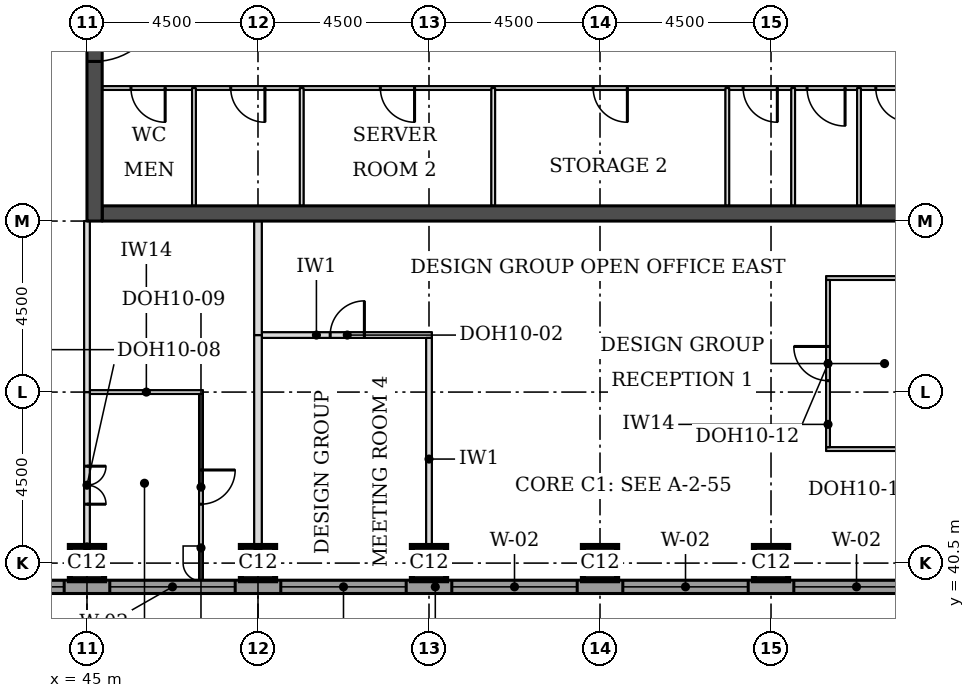
"""IFC4 building model, lengths in metres.
Left out: names, types, materials, properties, quantities, classifications, styles, units other than length and angle.
Written with IfcOpenShell. Run it as: python <this file> out.ifc"""

import sys

from ifc_helpers import new_model, si_unit, direction, frame, frame_2d, origin, origin_2d, place, context, subcontext, project, spatial, rectangle, extrude, element, fill, save


model = new_model("IFC4")
c1 = context("Model", 3, precision=1e-05, world=origin(), true_north=direction((0.0, 1.0)))
c2 = subcontext(c1, "Body", "Model", "MODEL_VIEW")
j1 = project(units=[si_unit("LENGTHUNIT", "METRE"), si_unit("PLANEANGLEUNIT", "RADIAN")], contexts=[c1])
p1 = place(None, origin())
s1 = spatial("IfcSite", under=j1, at=p1, CompositionType="ELEMENT")
p2 = place(p1, origin())
s2 = spatial("IfcBuilding", under=s1, at=p2, CompositionType="ELEMENT")
p3 = place(p2, frame((0.0, 0.0, 223.0)))
s3 = spatial("IfcBuildingStorey", under=s2, at=p3, CompositionType="ELEMENT", Elevation=223.0)
for number, where, z_axis, x_axis in (
    (1, (45.0, 40.5, 0.0), (0.0, 0.0, 1.0), (1.0, 0.0, 0.0)),
    (2, (49.5, 40.5, 0.0), (0.0, 0.0, 1.0), (1.0, 0.0, 0.0)),
    (3, (54.0, 40.5, 0.0), (0.0, 0.0, 1.0), (1.0, 0.0, 0.0)),
    (4, (58.5, 40.5, 0.0), (0.0, 0.0, 1.0), (1.0, 0.0, 0.0)),
    (5, (63.0, 40.5, 0.0), (0.0, 0.0, 1.0), (1.0, 0.0, 0.0)),
):
    element("IfcColumn", number, at=place(p3, frame(where, z_axis=z_axis, x_axis=x_axis)), inside=s3, PredefinedType="COLUMN", context=c2, shape_type="SweptSolid", body=[
        extrude(rectangle(XDim=0.9, YDim=0.9, at=origin_2d()), origin(), (0.0, 0.0, 1.0), 3.7),
    ])
p4 = place(p3, frame((45.4, 49.7, 0.0), z_axis=(0.0, 0.0, 1.0), x_axis=(1.0, 0.0, 0.0)))
e6 = element("IfcWall", 6, at=p4, inside=s3, PredefinedType="SHEAR", context=c2, shape_type="SweptSolid", body=[
    extrude(rectangle(XDim=21.7, YDim=0.4, at=frame_2d((10.85, 0.0))), origin(), (0.0, 0.0, 1.0), 3.7),
])
p5 = place(p3, frame((45.2, 49.5, 0.0), z_axis=(0.0, 0.0, 1.0), x_axis=(0.0, 1.0, 0.0)))
e7 = element("IfcWall", 7, at=p5, inside=s3, PredefinedType="SHEAR", context=c2, shape_type="SweptSolid", body=[
    extrude(rectangle(XDim=22.5, YDim=0.4, at=frame_2d((11.25, 0.0))), origin(), (0.0, 0.0, 1.0), 3.7),
])
p6 = place(p5, frame((4.2, 0.0, 0.0)))
e8 = element("IfcOpeningElement", 8, at=p6, cuts=e7, PredefinedType="OPENING", context=c2, shape_type="SweptSolid", body=[
    extrude(rectangle(XDim=1.8, YDim=2.1, at=frame_2d((0.9, 1.05))), frame((0.0, 0.21, 0.0), z_axis=(0.0, -1.0, 0.0), x_axis=(1.0, 0.0, 0.0)), (0.0, 0.0, 1.0), 0.42),
])
p7 = place(p5, frame((6.9, 0.0, 0.0)))
e9 = element("IfcOpeningElement", 9, at=p7, cuts=e7, PredefinedType="OPENING", context=c2, shape_type="SweptSolid", body=[
    extrude(rectangle(XDim=1.1, YDim=2.1, at=frame_2d((0.55, 1.05))), frame((0.0, 0.21, 0.0), z_axis=(0.0, -1.0, 0.0), x_axis=(1.0, 0.0, 0.0)), (0.0, 0.0, 1.0), 0.42),
])
p8 = place(p5, frame((13.6, 0.0, 0.0)))
e10 = element("IfcOpeningElement", 10, at=p8, cuts=e7, PredefinedType="OPENING", context=c2, shape_type="SweptSolid", body=[
    extrude(rectangle(XDim=1.1, YDim=2.1, at=frame_2d((0.55, 1.05))), frame((0.0, 0.21, 0.0), z_axis=(0.0, -1.0, 0.0), x_axis=(1.0, 0.0, 0.0)), (0.0, 0.0, 1.0), 0.42),
])
p9 = place(p5, frame((16.5, 0.0, 0.0)))
e11 = element("IfcOpeningElement", 11, at=p9, cuts=e7, PredefinedType="OPENING", context=c2, shape_type="SweptSolid", body=[
    extrude(rectangle(XDim=1.8, YDim=2.1, at=frame_2d((0.9, 1.05))), frame((0.0, 0.21, 0.0), z_axis=(0.0, -1.0, 0.0), x_axis=(1.0, 0.0, 0.0)), (0.0, 0.0, 1.0), 0.42),
])
p10 = place(p3, frame((36.0, 39.875, 0.0), z_axis=(0.0, 0.0, 1.0), x_axis=(1.0, 0.0, 0.0)))
e12 = element("IfcWall", 12, at=p10, inside=s3, PredefinedType="STANDARD", context=c2, shape_type="SweptSolid", body=[
    extrude(rectangle(XDim=36.331, YDim=0.35, at=frame_2d((18.166, 0.0))), origin(), (0.0, 0.0, 1.0), 3.525),
])
p11 = place(p10, frame((5.1, 0.0, 0.9)))
e13 = element("IfcOpeningElement", 13, at=p11, cuts=e12, PredefinedType="OPENING", context=c2, shape_type="SweptSolid", body=[
    extrude(rectangle(XDim=3.3, YDim=1.9, at=frame_2d((1.65, 0.95))), frame((0.0, 0.185, 0.0), z_axis=(0.0, -1.0, 0.0), x_axis=(1.0, 0.0, 0.0)), (0.0, 0.0, 1.0), 0.37),
])
p12 = place(p10, frame((9.6, 0.0, 0.9)))
e14 = element("IfcOpeningElement", 14, at=p12, cuts=e12, PredefinedType="OPENING", context=c2, shape_type="SweptSolid", body=[
    extrude(rectangle(XDim=3.3, YDim=1.9, at=frame_2d((1.65, 0.95))), frame((0.0, 0.185, 0.0), z_axis=(0.0, -1.0, 0.0), x_axis=(1.0, 0.0, 0.0)), (0.0, 0.0, 1.0), 0.37),
])
p13 = place(p10, frame((14.1, 0.0, 0.9)))
e15 = element("IfcOpeningElement", 15, at=p13, cuts=e12, PredefinedType="OPENING", context=c2, shape_type="SweptSolid", body=[
    extrude(rectangle(XDim=3.3, YDim=1.9, at=frame_2d((1.65, 0.95))), frame((0.0, 0.185, 0.0), z_axis=(0.0, -1.0, 0.0), x_axis=(1.0, 0.0, 0.0)), (0.0, 0.0, 1.0), 0.37),
])
p14 = place(p10, frame((18.6, 0.0, 0.9)))
e16 = element("IfcOpeningElement", 16, at=p14, cuts=e12, PredefinedType="OPENING", context=c2, shape_type="SweptSolid", body=[
    extrude(rectangle(XDim=3.3, YDim=1.9, at=frame_2d((1.65, 0.95))), frame((0.0, 0.185, 0.0), z_axis=(0.0, -1.0, 0.0), x_axis=(1.0, 0.0, 0.0)), (0.0, 0.0, 1.0), 0.37),
])
p15 = place(p10, frame((23.1, 0.0, 0.9)))
e17 = element("IfcOpeningElement", 17, at=p15, cuts=e12, PredefinedType="OPENING", context=c2, shape_type="SweptSolid", body=[
    extrude(rectangle(XDim=3.3, YDim=1.9, at=frame_2d((1.65, 0.95))), frame((0.0, 0.185, 0.0), z_axis=(0.0, -1.0, 0.0), x_axis=(1.0, 0.0, 0.0)), (0.0, 0.0, 1.0), 0.37),
])
p16 = place(p10, frame((27.6, 0.0, 0.9)))
e18 = element("IfcOpeningElement", 18, at=p16, cuts=e12, PredefinedType="OPENING", context=c2, shape_type="SweptSolid", body=[
    extrude(rectangle(XDim=3.3, YDim=1.9, at=frame_2d((1.65, 0.95))), frame((0.0, 0.185, 0.0), z_axis=(0.0, -1.0, 0.0), x_axis=(1.0, 0.0, 0.0)), (0.0, 0.0, 1.0), 0.37),
])
for number, where, z_axis, x_axis in (
    (19, (64.45, 43.5, 0.0), (0.0, 0.0, 1.0), (1.0, 0.0, 0.0)),
    (20, (45.075, 45.0, 0.0), (0.0, 0.0, 1.0), (1.0, 0.0, 0.0)),
):
    element("IfcWall", number, at=place(p3, frame(where, z_axis=z_axis, x_axis=x_axis)), inside=s3, PredefinedType="PARTITIONING", context=c2, shape_type="SweptSolid", body=[
        extrude(rectangle(XDim=2.975, YDim=0.1, at=frame_2d((1.488, 0.0))), origin(), (0.0, 0.0, 1.0), 3.55),
    ])
p17 = place(p3, frame((49.6, 46.5, 0.0), z_axis=(0.0, 0.0, 1.0), x_axis=(1.0, 0.0, 0.0)))
e21 = element("IfcWall", 21, at=p17, inside=s3, PredefinedType="PARTITIONING", context=c2, shape_type="SweptSolid", body=[
    extrude(rectangle(XDim=4.475, YDim=0.15, at=frame_2d((2.237, 0.0))), origin(), (0.0, 0.0, 1.0), 3.55),
])
p18 = place(p17, frame((1.8, 0.0, 0.0)))
e22 = element("IfcOpeningElement", 22, at=p18, cuts=e21, PredefinedType="OPENING", context=c2, shape_type="SweptSolid", body=[
    extrude(rectangle(XDim=0.9, YDim=2.1, at=frame_2d((0.45, 1.05))), frame((0.0, 0.085, 0.0), z_axis=(0.0, -1.0, 0.0), x_axis=(1.0, 0.0, 0.0)), (0.0, 0.0, 1.0), 0.17),
])
p19 = place(p3, frame((64.45, 48.0, 0.0), z_axis=(0.0, 0.0, 1.0), x_axis=(1.0, 0.0, 0.0)))
e23 = element("IfcWall", 23, at=p19, inside=s3, PredefinedType="PARTITIONING", context=c2, shape_type="SweptSolid", body=[
    extrude(rectangle(XDim=2.975, YDim=0.1, at=frame_2d((1.488, 0.0))), origin(), (0.0, 0.0, 1.0), 3.55),
])
p20 = place(p3, frame((45.0, 40.05, 0.0), z_axis=(0.0, 0.0, 1.0), x_axis=(0.0, 1.0, 0.0)))
e24 = element("IfcWall", 24, at=p20, inside=s3, PredefinedType="PARTITIONING", context=c2, shape_type="SweptSolid", body=[
    extrude(rectangle(XDim=4.95, YDim=0.15, at=frame_2d((2.475, 0.0))), origin(), (0.0, 0.0, 1.0), 3.022),
])
p21 = place(p20, frame((2.0, 0.0, 0.0)))
e25 = element("IfcOpeningElement", 25, at=p21, cuts=e24, PredefinedType="OPENING", context=c2, shape_type="SweptSolid", body=[
    extrude(rectangle(XDim=1.0, YDim=2.1, at=frame_2d((0.5, 1.05))), frame((0.0, 0.085, 0.0), z_axis=(0.0, -1.0, 0.0), x_axis=(1.0, 0.0, 0.0)), (0.0, 0.0, 1.0), 0.17),
])
p22 = place(p3, frame((48.0, 40.05, 0.0), z_axis=(0.0, 0.0, 1.0), x_axis=(0.0, 1.0, 0.0)))
e26 = element("IfcWall", 26, at=p22, inside=s3, PredefinedType="PARTITIONING", context=c2, shape_type="SweptSolid", body=[
    extrude(rectangle(XDim=4.9, YDim=0.1, at=frame_2d((2.45, 0.0))), origin(), (0.0, 0.0, 1.0), 3.55),
])
p23 = place(p22, frame((2.0, 0.0, 0.0)))
e27 = element("IfcOpeningElement", 27, at=p23, cuts=e26, PredefinedType="OPENING", context=c2, shape_type="SweptSolid", body=[
    extrude(rectangle(XDim=0.9, YDim=2.1, at=frame_2d((0.45, 1.05))), frame((0.0, 0.06, 0.0), z_axis=(0.0, -1.0, 0.0), x_axis=(1.0, 0.0, 0.0)), (0.0, 0.0, 1.0), 0.12),
])
p24 = place(p3, frame((49.5, 40.05, 0.0), z_axis=(0.0, 0.0, 1.0), x_axis=(0.0, 1.0, 0.0)))
e28 = element("IfcWall", 28, at=p24, inside=s3, PredefinedType="PARTITIONING", context=c2, shape_type="SweptSolid", body=[
    extrude(rectangle(XDim=6.45, YDim=0.2, at=frame_2d((3.225, 0.0))), origin(), (0.0, 0.0, 1.0), 3.55),
])
p25 = place(p3, frame((54.0, 40.05, 0.0), z_axis=(0.0, 0.0, 1.0), x_axis=(0.0, 1.0, 0.0)))
e29 = element("IfcWall", 29, at=p25, inside=s3, PredefinedType="PARTITIONING", context=c2, shape_type="SweptSolid", body=[
    extrude(rectangle(XDim=6.375, YDim=0.15, at=frame_2d((3.188, 0.0))), origin(), (0.0, 0.0, 1.0), 3.55),
])
p26 = place(p3, frame((64.5, 43.55, 0.0), z_axis=(0.0, 0.0, 1.0), x_axis=(0.0, 1.0, 0.0)))
e30 = element("IfcWall", 30, at=p26, inside=s3, PredefinedType="PARTITIONING", context=c2, shape_type="SweptSolid", body=[
    extrude(rectangle(XDim=4.4, YDim=0.1, at=frame_2d((2.2, 0.0))), origin(), (0.0, 0.0, 1.0), 3.55),
])
p27 = place(p26, frame((1.75, 0.0, 0.0)))
e31 = element("IfcOpeningElement", 31, at=p27, cuts=e30, PredefinedType="OPENING", context=c2, shape_type="SweptSolid", body=[
    extrude(rectangle(XDim=0.9, YDim=2.1, at=frame_2d((0.45, 1.05))), frame((0.0, 0.06, 0.0), z_axis=(0.0, -1.0, 0.0), x_axis=(1.0, 0.0, 0.0)), (0.0, 0.0, 1.0), 0.12),
])
p28 = place(p3, frame((45.0, 45.0, 0.0), z_axis=(0.0, 0.0, 1.0), x_axis=(0.0, 1.0, 0.0)))
e32 = element("IfcWall", 32, at=p28, inside=s3, PredefinedType="PARTITIONING", context=c2, shape_type="SweptSolid", body=[
    extrude(rectangle(XDim=4.5, YDim=0.15, at=frame_2d((2.25, 0.0))), origin(), (0.0, 0.0, 1.0), 3.022),
])
p29 = place(p3, frame((49.5, 46.5, 0.0), z_axis=(0.0, 0.0, 1.0), x_axis=(0.0, 1.0, 0.0)))
e33 = element("IfcWall", 33, at=p29, inside=s3, PredefinedType="PARTITIONING", context=c2, shape_type="SweptSolid", body=[
    extrude(rectangle(XDim=3.0, YDim=0.2, at=frame_2d((1.5, 0.0))), origin(), (0.0, 0.0, 1.0), 3.55),
])
p30 = place(p3, frame((45.4, 53.0, 0.0), z_axis=(0.0, 0.0, 1.0), x_axis=(1.0, 0.0, 0.0)))
e34 = element("IfcWall", 34, at=p30, inside=s3, PredefinedType="PARTITIONING", context=c2, shape_type="SweptSolid", body=[
    extrude(rectangle(XDim=21.7, YDim=0.1, at=frame_2d((10.85, 0.0))), origin(), (0.0, 0.0, 1.0), 3.55),
])
p31 = place(p30, frame((20.357, 0.0, 0.0)))
e35 = element("IfcOpeningElement", 35, at=p31, cuts=e34, PredefinedType="OPENING", context=c2, shape_type="SweptSolid", body=[
    extrude(rectangle(XDim=0.9, YDim=2.1, at=frame_2d((0.45, 1.05))), frame((0.0, 0.06, 0.0), z_axis=(0.0, -1.0, 0.0), x_axis=(1.0, 0.0, 0.0)), (0.0, 0.0, 1.0), 0.12),
])
p32 = place(p30, frame((18.549, 0.0, 0.0)))
e36 = element("IfcOpeningElement", 36, at=p32, cuts=e34, PredefinedType="OPENING", context=c2, shape_type="SweptSolid", body=[
    extrude(rectangle(XDim=1.0, YDim=2.1, at=frame_2d((0.5, 1.05))), frame((0.0, 0.06, 0.0), z_axis=(0.0, -1.0, 0.0), x_axis=(1.0, 0.0, 0.0)), (0.0, 0.0, 1.0), 0.12),
])
p33 = place(p30, frame((16.866, 0.0, 0.0)))
e37 = element("IfcOpeningElement", 37, at=p33, cuts=e34, PredefinedType="OPENING", context=c2, shape_type="SweptSolid", body=[
    extrude(rectangle(XDim=0.9, YDim=2.1, at=frame_2d((0.45, 1.05))), frame((0.0, 0.06, 0.0), z_axis=(0.0, -1.0, 0.0), x_axis=(1.0, 0.0, 0.0)), (0.0, 0.0, 1.0), 0.12),
])
p34 = place(p30, frame((0.758, 0.0, 0.0)))
e38 = element("IfcOpeningElement", 38, at=p34, cuts=e34, PredefinedType="OPENING", context=c2, shape_type="SweptSolid", body=[
    extrude(rectangle(XDim=0.9, YDim=2.1, at=frame_2d((0.45, 1.05))), frame((0.0, 0.06, 0.0), z_axis=(0.0, -1.0, 0.0), x_axis=(1.0, 0.0, 0.0)), (0.0, 0.0, 1.0), 0.12),
])
p35 = place(p30, frame((3.383, 0.0, 0.0)))
e39 = element("IfcOpeningElement", 39, at=p35, cuts=e34, PredefinedType="OPENING", context=c2, shape_type="SweptSolid", body=[
    extrude(rectangle(XDim=0.9, YDim=2.1, at=frame_2d((0.45, 1.05))), frame((0.0, 0.06, 0.0), z_axis=(0.0, -1.0, 0.0), x_axis=(1.0, 0.0, 0.0)), (0.0, 0.0, 1.0), 0.12),
])
p36 = place(p30, frame((7.32, 0.0, 0.0)))
e40 = element("IfcOpeningElement", 40, at=p36, cuts=e34, PredefinedType="OPENING", context=c2, shape_type="SweptSolid", body=[
    extrude(rectangle(XDim=0.9, YDim=2.1, at=frame_2d((0.45, 1.05))), frame((0.0, 0.06, 0.0), z_axis=(0.0, -1.0, 0.0), x_axis=(1.0, 0.0, 0.0)), (0.0, 0.0, 1.0), 0.12),
])
p37 = place(p30, frame((12.92, 0.0, 0.0)))
e41 = element("IfcOpeningElement", 41, at=p37, cuts=e34, PredefinedType="OPENING", context=c2, shape_type="SweptSolid", body=[
    extrude(rectangle(XDim=0.9, YDim=2.1, at=frame_2d((0.45, 1.05))), frame((0.0, 0.06, 0.0), z_axis=(0.0, -1.0, 0.0), x_axis=(1.0, 0.0, 0.0)), (0.0, 0.0, 1.0), 0.12),
])
for number, where, z_axis, x_axis in (
    (42, (47.815, 49.9, 0.0), (0.0, 0.0, 1.0), (0.0, 1.0, 0.0)),
    (43, (50.65, 49.9, 0.0), (0.0, 0.0, 1.0), (0.0, 1.0, 0.0)),
    (44, (55.69, 49.9, 0.0), (0.0, 0.0, 1.0), (0.0, 1.0, 0.0)),
    (45, (61.85, 49.9, 0.0), (0.0, 0.0, 1.0), (0.0, 1.0, 0.0)),
    (46, (63.583, 49.9, 0.0), (0.0, 0.0, 1.0), (0.0, 1.0, 0.0)),
    (47, (65.315, 49.9, 0.0), (0.0, 0.0, 1.0), (0.0, 1.0, 0.0)),
):
    element("IfcWall", number, at=place(p3, frame(where, z_axis=z_axis, x_axis=x_axis)), inside=s3, PredefinedType="PARTITIONING", context=c2, shape_type="SweptSolid", body=[
        extrude(rectangle(XDim=3.1, YDim=0.1, at=frame_2d((1.55, 0.0))), origin(), (0.0, 0.0, 1.0), 3.55),
    ])
p38 = place(p11, origin())
e48 = element("IfcWindow", 48, at=p38, inside=s3, PartitioningType="SINGLE_PANEL", PredefinedType="WINDOW", context=c2, shape_type="SweptSolid", body=[
    extrude(rectangle(XDim=3.3, YDim=1.9, at=frame_2d((1.65, 0.95))), frame((0.0, 0.085, 0.0), z_axis=(0.0, -1.0, 0.0), x_axis=(1.0, 0.0, 0.0)), (0.0, 0.0, 1.0), 0.06),
])
fill(e13, e48)
p39 = place(p12, origin())
e49 = element("IfcWindow", 49, at=p39, inside=s3, PartitioningType="SINGLE_PANEL", PredefinedType="WINDOW", context=c2, shape_type="SweptSolid", body=[
    extrude(rectangle(XDim=3.3, YDim=1.9, at=frame_2d((1.65, 0.95))), frame((0.0, 0.085, 0.0), z_axis=(0.0, -1.0, 0.0), x_axis=(1.0, 0.0, 0.0)), (0.0, 0.0, 1.0), 0.06),
])
fill(e14, e49)
p40 = place(p13, origin())
e50 = element("IfcWindow", 50, at=p40, inside=s3, PartitioningType="SINGLE_PANEL", PredefinedType="WINDOW", context=c2, shape_type="SweptSolid", body=[
    extrude(rectangle(XDim=3.3, YDim=1.9, at=frame_2d((1.65, 0.95))), frame((0.0, 0.085, 0.0), z_axis=(0.0, -1.0, 0.0), x_axis=(1.0, 0.0, 0.0)), (0.0, 0.0, 1.0), 0.06),
])
fill(e15, e50)
p41 = place(p14, origin())
e51 = element("IfcWindow", 51, at=p41, inside=s3, PartitioningType="SINGLE_PANEL", PredefinedType="WINDOW", context=c2, shape_type="SweptSolid", body=[
    extrude(rectangle(XDim=3.3, YDim=1.9, at=frame_2d((1.65, 0.95))), frame((0.0, 0.085, 0.0), z_axis=(0.0, -1.0, 0.0), x_axis=(1.0, 0.0, 0.0)), (0.0, 0.0, 1.0), 0.06),
])
fill(e16, e51)
p42 = place(p15, origin())
e52 = element("IfcWindow", 52, at=p42, inside=s3, PartitioningType="SINGLE_PANEL", PredefinedType="WINDOW", context=c2, shape_type="SweptSolid", body=[
    extrude(rectangle(XDim=3.3, YDim=1.9, at=frame_2d((1.65, 0.95))), frame((0.0, 0.085, 0.0), z_axis=(0.0, -1.0, 0.0), x_axis=(1.0, 0.0, 0.0)), (0.0, 0.0, 1.0), 0.06),
])
fill(e17, e52)
p43 = place(p16, origin())
e53 = element("IfcWindow", 53, at=p43, inside=s3, PartitioningType="SINGLE_PANEL", PredefinedType="WINDOW", context=c2, shape_type="SweptSolid", body=[
    extrude(rectangle(XDim=3.3, YDim=1.9, at=frame_2d((1.65, 0.95))), frame((0.0, 0.085, 0.0), z_axis=(0.0, -1.0, 0.0), x_axis=(1.0, 0.0, 0.0)), (0.0, 0.0, 1.0), 0.06),
])
fill(e18, e53)
p44 = place(p21, frame((1.0, 0.0, 0.0), z_axis=(0.0, 0.0, 1.0), x_axis=(-1.0, 0.0, 0.0)))
e54 = element("IfcDoor", 54, at=p44, inside=s3, OperationType="DOUBLE_DOOR_SINGLE_SWING", PredefinedType="DOOR", context=c2, shape_type="SweptSolid", body=[
    extrude(rectangle(XDim=1.0, YDim=2.1, at=frame_2d((0.5, 1.05))), frame((0.0, 0.025, 0.0), z_axis=(0.0, -1.0, 0.0), x_axis=(1.0, 0.0, 0.0)), (0.0, 0.0, 1.0), 0.05),
])
fill(e25, e54)
p45 = place(p23, frame((0.9, 0.0, 0.0), z_axis=(0.0, 0.0, 1.0), x_axis=(-1.0, 0.0, 0.0)))
e55 = element("IfcDoor", 55, at=p45, inside=s3, OperationType="SINGLE_SWING_LEFT", PredefinedType="DOOR", context=c2, shape_type="SweptSolid", body=[
    extrude(rectangle(XDim=0.9, YDim=2.1, at=frame_2d((0.45, 1.05))), frame((0.0, 0.025, 0.0), z_axis=(0.0, -1.0, 0.0), x_axis=(1.0, 0.0, 0.0)), (0.0, 0.0, 1.0), 0.05),
])
fill(e27, e55)
p46 = place(p27, origin())
e56 = element("IfcDoor", 56, at=p46, inside=s3, OperationType="SINGLE_SWING_RIGHT", PredefinedType="DOOR", context=c2, shape_type="SweptSolid", body=[
    extrude(rectangle(XDim=0.9, YDim=2.1, at=frame_2d((0.45, 1.05))), frame((0.0, 0.025, 0.0), z_axis=(0.0, -1.0, 0.0), x_axis=(1.0, 0.0, 0.0)), (0.0, 0.0, 1.0), 0.05),
])
fill(e31, e56)
p47 = place(p18, origin())
e57 = element("IfcDoor", 57, at=p47, inside=s3, OperationType="SINGLE_SWING_RIGHT", PredefinedType="DOOR", context=c2, shape_type="SweptSolid", body=[
    extrude(rectangle(XDim=0.9, YDim=2.1, at=frame_2d((0.45, 1.05))), frame((0.0, 0.025, 0.0), z_axis=(0.0, -1.0, 0.0), x_axis=(1.0, 0.0, 0.0)), (0.0, 0.0, 1.0), 0.05),
])
fill(e22, e57)
p48 = place(p6, frame((1.8, 0.0, 0.0), z_axis=(0.0, 0.0, 1.0), x_axis=(-1.0, 0.0, 0.0)))
e58 = element("IfcDoor", 58, at=p48, inside=s3, OperationType="SINGLE_SWING_LEFT", PredefinedType="DOOR", context=c2, shape_type="SweptSolid", body=[
    extrude(rectangle(XDim=1.8, YDim=2.1, at=frame_2d((0.9, 1.05))), frame((0.0, 0.025, 0.0), z_axis=(0.0, -1.0, 0.0), x_axis=(1.0, 0.0, 0.0)), (0.0, 0.0, 1.0), 0.05),
])
fill(e8, e58)
p49 = place(p31, frame((0.9, 0.0, 0.0), z_axis=(0.0, 0.0, 1.0), x_axis=(-1.0, 0.0, 0.0)))
e59 = element("IfcDoor", 59, at=p49, inside=s3, OperationType="SINGLE_SWING_LEFT", PredefinedType="DOOR", context=c2, shape_type="SweptSolid", body=[
    extrude(rectangle(XDim=0.9, YDim=2.1, at=frame_2d((0.45, 1.05))), frame((0.0, 0.025, 0.0), z_axis=(0.0, -1.0, 0.0), x_axis=(1.0, 0.0, 0.0)), (0.0, 0.0, 1.0), 0.05),
])
fill(e35, e59)
p50 = place(p32, frame((1.0, 0.0, 0.0), z_axis=(0.0, 0.0, 1.0), x_axis=(-1.0, 0.0, 0.0)))
e60 = element("IfcDoor", 60, at=p50, inside=s3, OperationType="SINGLE_SWING_LEFT", PredefinedType="DOOR", context=c2, shape_type="SweptSolid", body=[
    extrude(rectangle(XDim=1.0, YDim=2.1, at=frame_2d((0.5, 1.05))), frame((0.0, 0.025, 0.0), z_axis=(0.0, -1.0, 0.0), x_axis=(1.0, 0.0, 0.0)), (0.0, 0.0, 1.0), 0.05),
])
fill(e36, e60)
p51 = place(p33, frame((0.9, 0.0, 0.0), z_axis=(0.0, 0.0, 1.0), x_axis=(-1.0, 0.0, 0.0)))
e61 = element("IfcDoor", 61, at=p51, inside=s3, OperationType="SINGLE_SWING_LEFT", PredefinedType="DOOR", context=c2, shape_type="SweptSolid", body=[
    extrude(rectangle(XDim=0.9, YDim=2.1, at=frame_2d((0.45, 1.05))), frame((0.0, 0.025, 0.0), z_axis=(0.0, -1.0, 0.0), x_axis=(1.0, 0.0, 0.0)), (0.0, 0.0, 1.0), 0.05),
])
fill(e37, e61)
p52 = place(p34, frame((0.9, 0.0, 0.0), z_axis=(0.0, 0.0, 1.0), x_axis=(-1.0, 0.0, 0.0)))
e62 = element("IfcDoor", 62, at=p52, inside=s3, OperationType="SINGLE_SWING_LEFT", PredefinedType="DOOR", context=c2, shape_type="SweptSolid", body=[
    extrude(rectangle(XDim=0.9, YDim=2.1, at=frame_2d((0.45, 1.05))), frame((0.0, 0.025, 0.0), z_axis=(0.0, -1.0, 0.0), x_axis=(1.0, 0.0, 0.0)), (0.0, 0.0, 1.0), 0.05),
])
fill(e38, e62)
p53 = place(p35, frame((0.9, 0.0, 0.0), z_axis=(0.0, 0.0, 1.0), x_axis=(-1.0, 0.0, 0.0)))
e63 = element("IfcDoor", 63, at=p53, inside=s3, OperationType="SINGLE_SWING_LEFT", PredefinedType="DOOR", context=c2, shape_type="SweptSolid", body=[
    extrude(rectangle(XDim=0.9, YDim=2.1, at=frame_2d((0.45, 1.05))), frame((0.0, 0.025, 0.0), z_axis=(0.0, -1.0, 0.0), x_axis=(1.0, 0.0, 0.0)), (0.0, 0.0, 1.0), 0.05),
])
fill(e39, e63)
p54 = place(p36, frame((0.9, 0.0, 0.0), z_axis=(0.0, 0.0, 1.0), x_axis=(-1.0, 0.0, 0.0)))
e64 = element("IfcDoor", 64, at=p54, inside=s3, OperationType="SINGLE_SWING_LEFT", PredefinedType="DOOR", context=c2, shape_type="SweptSolid", body=[
    extrude(rectangle(XDim=0.9, YDim=2.1, at=frame_2d((0.45, 1.05))), frame((0.0, 0.025, 0.0), z_axis=(0.0, -1.0, 0.0), x_axis=(1.0, 0.0, 0.0)), (0.0, 0.0, 1.0), 0.05),
])
fill(e40, e64)
p55 = place(p37, frame((0.9, 0.0, 0.0), z_axis=(0.0, 0.0, 1.0), x_axis=(-1.0, 0.0, 0.0)))
e65 = element("IfcDoor", 65, at=p55, inside=s3, OperationType="SINGLE_SWING_LEFT", PredefinedType="DOOR", context=c2, shape_type="SweptSolid", body=[
    extrude(rectangle(XDim=0.9, YDim=2.1, at=frame_2d((0.45, 1.05))), frame((0.0, 0.025, 0.0), z_axis=(0.0, -1.0, 0.0), x_axis=(1.0, 0.0, 0.0)), (0.0, 0.0, 1.0), 0.05),
])
fill(e41, e65)
save(model, sys.argv[1])
